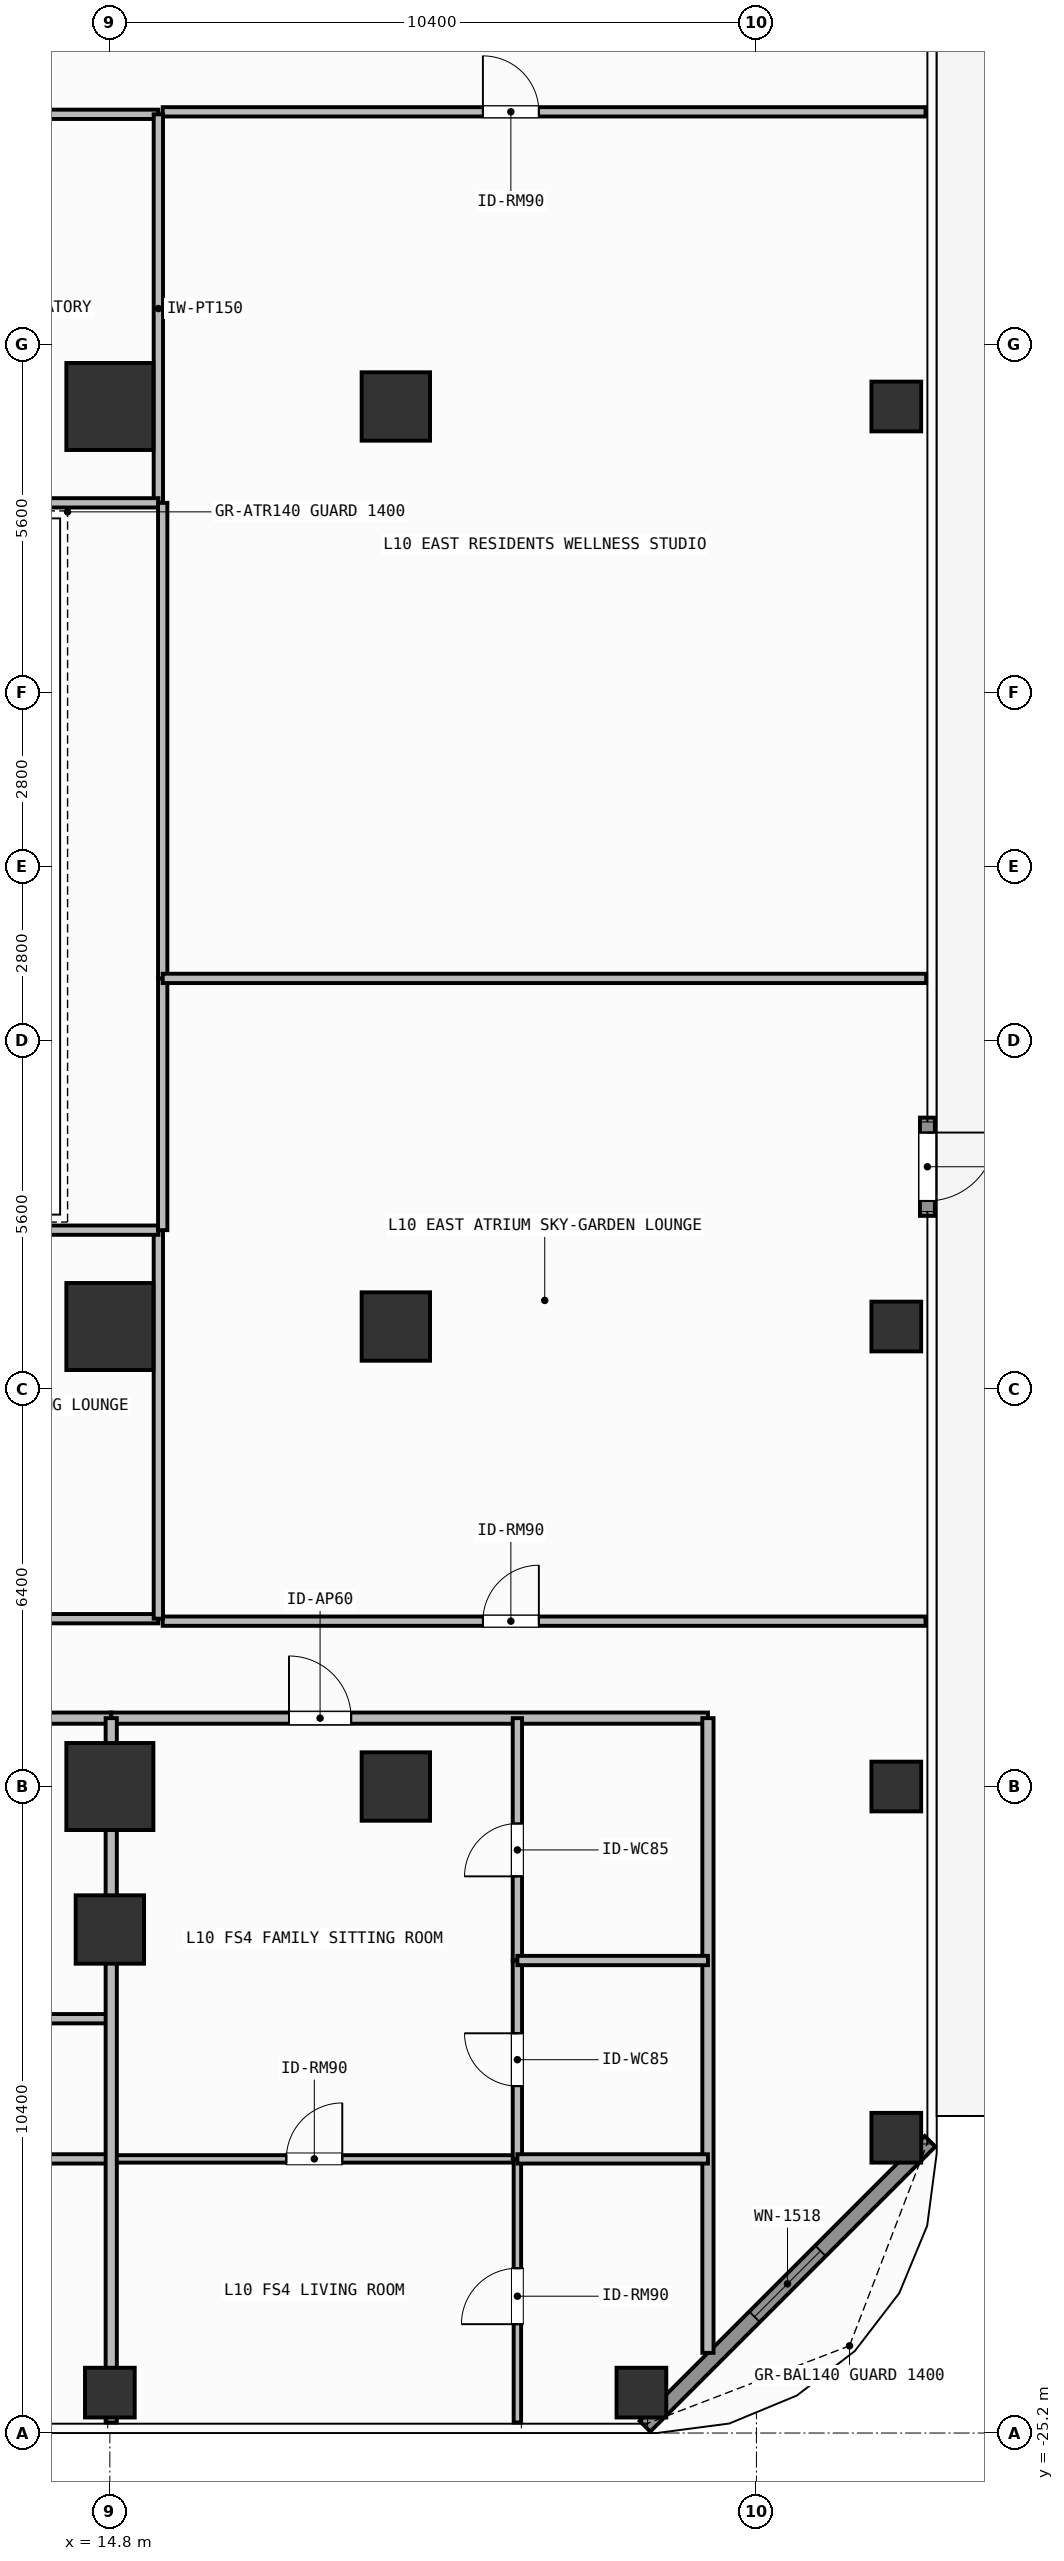
"""IFC4 building model, lengths in metres.
Left out: names, types, materials, properties, quantities, classifications, styles, units other than length and angle.
Written with IfcOpenShell. Run it as: python <this file> out.ifc"""

import sys

from ifc_helpers import new_model, si_unit, direction, frame, frame_2d, origin, origin_2d, place, context, subcontext, project, spatial, rectangle, hollow_rectangle, extrude, element, fill, save


model = new_model("IFC4")
c1 = context("Model", 3, precision=1e-05, world=origin(), true_north=direction((0.0, 1.0)))
c2 = subcontext(c1, "Body", "Model", "MODEL_VIEW")
j1 = project(units=[si_unit("LENGTHUNIT", "METRE"), si_unit("PLANEANGLEUNIT", "RADIAN")], contexts=[c1])
p1 = place(None, origin())
s1 = spatial("IfcSite", under=j1, at=p1, CompositionType="ELEMENT")
p2 = place(p1, origin())
s2 = spatial("IfcBuilding", under=s1, at=p2, CompositionType="ELEMENT")
p3 = place(p2, frame((0.0, 0.0, 38.4)))
s3 = spatial("IfcBuildingStorey", under=s2, at=p3, CompositionType="ELEMENT", Elevation=38.4)
for number, where, z_axis, x_axis in (
    (1, (14.8, -14.8, 0.0), (0.0, 0.0, 1.0), (1.0, 0.0, 0.0)),
    (2, (14.8, -7.4, 0.0), (0.0, 0.0, 1.0), (1.0, 0.0, 0.0)),
    (3, (14.8, 7.4, 0.0), (0.0, 0.0, 1.0), (1.0, 0.0, 0.0)),
):
    element("IfcColumn", number, at=place(p3, frame(where, z_axis=z_axis, x_axis=x_axis)), inside=s3, PredefinedType="COLUMN", context=c2, shape_type="SweptSolid", body=[
        extrude(rectangle(XDim=1.4, YDim=1.4, at=origin_2d()), origin(), (0.0, 0.0, 1.0), 3.9),
    ])
for number, where, z_axis, x_axis in (
    (4, (19.4, -14.8, 0.0), (0.0, 0.0, 1.0), (1.0, 0.0, 0.0)),
    (5, (19.4, -7.4, 0.0), (0.0, 0.0, 1.0), (1.0, 0.0, 0.0)),
    (6, (19.4, 7.4, 0.0), (0.0, 0.0, 1.0), (1.0, 0.0, 0.0)),
    (7, (14.8, -17.1, 0.0), (0.0, 0.0, 1.0), (1.0, 0.0, 0.0)),
):
    element("IfcColumn", number, at=place(p3, frame(where, z_axis=z_axis, x_axis=x_axis)), inside=s3, PredefinedType="COLUMN", context=c2, shape_type="SweptSolid", body=[
        extrude(rectangle(XDim=1.1, YDim=1.1, at=origin_2d()), origin(), (0.0, 0.0, 1.0), 3.9),
    ])
for number, where, z_axis, x_axis in (
    (8, (23.35, -24.55, 0.0), (0.0, 0.0, 1.0), (1.0, 0.0, 0.0)),
    (9, (27.45, -20.45, 0.0), (0.0, 0.0, 1.0), (1.0, 0.0, 0.0)),
    (10, (14.8, -24.55, 0.0), (0.0, 0.0, 1.0), (1.0, 0.0, 0.0)),
    (11, (27.45, -14.8, 0.0), (0.0, 0.0, 1.0), (1.0, 0.0, 0.0)),
    (12, (27.45, -7.4, 0.0), (0.0, 0.0, 1.0), (1.0, 0.0, 0.0)),
    (13, (27.45, 7.4, 0.0), (0.0, 0.0, 1.0), (1.0, 0.0, 0.0)),
):
    element("IfcColumn", number, at=place(p3, frame(where, z_axis=z_axis, x_axis=x_axis)), inside=s3, PredefinedType="COLUMN", context=c2, shape_type="SweptSolid", body=[
        extrude(hollow_rectangle(XDim=0.8, YDim=0.8, WallThickness=0.036, at=origin_2d()), origin(), (0.0, 0.0, 1.0), 3.9),
    ])
p4 = place(p3, frame((27.95, -4.04, 0.0), z_axis=(0.0, 0.0, 1.0), x_axis=(0.0, -1.0, 0.0)))
e14 = element("IfcWall", 14, at=p4, inside=s3, PredefinedType="SOLIDWALL", context=c2, shape_type="SweptSolid", body=[
    extrude(rectangle(XDim=1.58, YDim=0.24, at=frame_2d((0.79, 0.0))), origin(), (0.0, 0.0, 1.0), 3.68),
])
p5 = place(p4, frame((0.24, 0.0, 0.0)))
e15 = element("IfcOpeningElement", 15, at=p5, cuts=e14, PredefinedType="OPENING", context=c2, shape_type="SweptSolid", body=[
    extrude(rectangle(XDim=1.1, YDim=2.2, at=frame_2d((0.55, 1.1))), frame((0.0, 0.13, 0.0), z_axis=(0.0, -1.0, 0.0), x_axis=(1.0, 0.0, 0.0)), (0.0, 0.0, 1.0), 0.26),
])
p6 = place(p3, frame((27.992, -20.508, 0.0), z_axis=(0.0, 0.0, 1.0), x_axis=(-0.707106781187, -0.707106781187, 0.0)))
e16 = element("IfcWall", 16, at=p6, inside=s3, PredefinedType="SOLIDWALL", context=c2, shape_type="SweptSolid", body=[
    extrude(rectangle(XDim=6.484, YDim=0.24, at=frame_2d((3.242, 0.0))), origin(), (0.0, 0.0, 1.0), 3.68),
])
p7 = place(p6, frame((2.492, 0.0, 0.8)))
e17 = element("IfcOpeningElement", 17, at=p7, cuts=e16, PredefinedType="OPENING", context=c2, shape_type="SweptSolid", body=[
    extrude(rectangle(XDim=1.5, YDim=1.85, at=frame_2d((0.75, 0.925))), frame((0.0, 0.13, 0.0), z_axis=(0.0, -1.0, 0.0), x_axis=(1.0, 0.0, 0.0)), (0.0, 0.0, 1.0), 0.26),
])
p8 = place(p3, frame((10.1, -12.1, 0.0), z_axis=(0.0, 0.0, 1.0), x_axis=(1.0, 0.0, 0.0)))
e18 = element("IfcWall", 18, at=p8, inside=s3, PredefinedType="PARTITIONING", context=c2, shape_type="SweptSolid", body=[
    extrude(rectangle(XDim=5.48, YDim=0.15, at=frame_2d((2.74, 0.0))), origin(), (0.0, 0.0, 1.0), 3.68),
])
p9 = place(p8, frame((2.29, 0.0, 0.0)))
e19 = element("IfcOpeningElement", 19, at=p9, cuts=e18, PredefinedType="OPENING", context=c2, shape_type="SweptSolid", body=[
    extrude(rectangle(XDim=0.9, YDim=2.1, at=frame_2d((0.45, 1.05))), frame((0.0, 0.085, 0.0), z_axis=(0.0, -1.0, 0.0), x_axis=(1.0, 0.0, 0.0)), (0.0, 0.0, 1.0), 0.17),
])
p10 = place(p3, frame((8.36, 12.1, 0.0), z_axis=(0.0, 0.0, 1.0), x_axis=(1.0, 0.0, 0.0)))
e20 = element("IfcWall", 20, at=p10, inside=s3, PredefinedType="PARTITIONING", context=c2, shape_type="SweptSolid", body=[
    extrude(rectangle(XDim=7.22, YDim=0.15, at=frame_2d((3.61, 0.0))), origin(), (0.0, 0.0, 1.0), 3.68),
])
p11 = place(p10, frame((3.513, 0.0, 0.0)))
e21 = element("IfcOpeningElement", 21, at=p11, cuts=e20, PredefinedType="OPENING", context=c2, shape_type="SweptSolid", body=[
    extrude(rectangle(XDim=0.9, YDim=2.1, at=frame_2d((0.45, 1.05))), frame((0.0, 0.085, 0.0), z_axis=(0.0, -1.0, 0.0), x_axis=(1.0, 0.0, 0.0)), (0.0, 0.0, 1.0), 0.17),
])
p12 = place(p3, frame((2.9, -13.7, 0.0), z_axis=(0.0, 0.0, 1.0), x_axis=(1.0, 0.0, 0.0)))
e22 = element("IfcWall", 22, at=p12, inside=s3, PredefinedType="PARTITIONING", context=c2, shape_type="SweptSolid", body=[
    extrude(rectangle(XDim=11.922, YDim=0.18, at=frame_2d((5.961, 0.0))), origin(), (0.0, 0.0, 1.0), 3.68),
])
p13 = place(p12, frame((5.371, 0.0, 0.0)))
e23 = element("IfcOpeningElement", 23, at=p13, cuts=e22, PredefinedType="OPENING", context=c2, shape_type="SweptSolid", body=[
    extrude(rectangle(XDim=1.0, YDim=2.2, at=frame_2d((0.5, 1.1))), frame((0.0, 0.1, 0.0), z_axis=(0.0, -1.0, 0.0), x_axis=(1.0, 0.0, 0.0)), (0.0, 0.0, 1.0), 0.2),
])
p14 = place(p3, frame((14.822, -13.7, 0.0), z_axis=(0.0, 0.0, 1.0), x_axis=(1.0, 0.0, 0.0)))
e24 = element("IfcWall", 24, at=p14, inside=s3, PredefinedType="PARTITIONING", context=c2, shape_type="SweptSolid", body=[
    extrude(rectangle(XDim=9.598, YDim=0.18, at=frame_2d((4.799, 0.0))), origin(), (0.0, 0.0, 1.0), 3.68),
])
p15 = place(p14, frame((2.859, 0.0, 0.0)))
e25 = element("IfcOpeningElement", 25, at=p15, cuts=e24, PredefinedType="OPENING", context=c2, shape_type="SweptSolid", body=[
    extrude(rectangle(XDim=1.0, YDim=2.2, at=frame_2d((0.5, 1.1))), frame((0.0, 0.1, 0.0), z_axis=(0.0, -1.0, 0.0), x_axis=(1.0, 0.0, 0.0)), (0.0, 0.0, 1.0), 0.2),
])
p16 = place(p3, frame((14.822, -20.79, 0.0), z_axis=(0.0, 0.0, 1.0), x_axis=(1.0, 0.0, 0.0)))
e26 = element("IfcWall", 26, at=p16, inside=s3, PredefinedType="PARTITIONING", context=c2, shape_type="SweptSolid", body=[
    extrude(rectangle(XDim=6.533, YDim=0.12, at=frame_2d((3.267, 0.0))), origin(), (0.0, 0.0, 1.0), 3.68),
])
p17 = place(p16, frame((2.816, 0.0, 0.0)))
e27 = element("IfcOpeningElement", 27, at=p17, cuts=e26, PredefinedType="OPENING", context=c2, shape_type="SweptSolid", body=[
    extrude(rectangle(XDim=0.9, YDim=2.1, at=frame_2d((0.45, 1.05))), frame((0.0, 0.07, 0.0), z_axis=(0.0, -1.0, 0.0), x_axis=(1.0, 0.0, 0.0)), (0.0, 0.0, 1.0), 0.14),
])
p18 = place(p3, frame((21.355, -17.599, 0.0), z_axis=(0.0, 0.0, 1.0), x_axis=(0.0, 1.0, 0.0)))
e28 = element("IfcWall", 28, at=p18, inside=s3, PredefinedType="PARTITIONING", context=c2, shape_type="SweptSolid", body=[
    extrude(rectangle(XDim=3.899, YDim=0.15, at=frame_2d((1.95, 0.0))), origin(), (0.0, 0.0, 1.0), 3.68),
])
p19 = place(p18, frame((1.354, 0.0, 0.0)))
e29 = element("IfcOpeningElement", 29, at=p19, cuts=e28, PredefinedType="OPENING", context=c2, shape_type="SweptSolid", body=[
    extrude(rectangle(XDim=0.85, YDim=2.1, at=frame_2d((0.425, 1.05))), frame((0.0, 0.085, 0.0), z_axis=(0.0, -1.0, 0.0), x_axis=(1.0, 0.0, 0.0)), (0.0, 0.0, 1.0), 0.17),
])
p20 = place(p3, frame((21.355, -20.79, 0.0), z_axis=(0.0, 0.0, 1.0), x_axis=(0.0, 1.0, 0.0)))
e30 = element("IfcWall", 30, at=p20, inside=s3, PredefinedType="PARTITIONING", context=c2, shape_type="SweptSolid", body=[
    extrude(rectangle(XDim=3.191, YDim=0.15, at=frame_2d((1.595, 0.0))), origin(), (0.0, 0.0, 1.0), 3.68),
])
p21 = place(p20, frame((1.17, 0.0, 0.0)))
e31 = element("IfcOpeningElement", 31, at=p21, cuts=e30, PredefinedType="OPENING", context=c2, shape_type="SweptSolid", body=[
    extrude(rectangle(XDim=0.85, YDim=2.1, at=frame_2d((0.425, 1.05))), frame((0.0, 0.085, 0.0), z_axis=(0.0, -1.0, 0.0), x_axis=(1.0, 0.0, 0.0)), (0.0, 0.0, 1.0), 0.17),
])
p22 = place(p3, frame((21.355, -25.03, 0.0), z_axis=(0.0, 0.0, 1.0), x_axis=(0.0, 1.0, 0.0)))
e32 = element("IfcWall", 32, at=p22, inside=s3, PredefinedType="PARTITIONING", context=c2, shape_type="SweptSolid", body=[
    extrude(rectangle(XDim=4.24, YDim=0.12, at=frame_2d((2.12, 0.0))), origin(), (0.0, 0.0, 1.0), 3.68),
])
p23 = place(p22, frame((1.581, 0.0, 0.0)))
e33 = element("IfcOpeningElement", 33, at=p23, cuts=e32, PredefinedType="OPENING", context=c2, shape_type="SweptSolid", body=[
    extrude(rectangle(XDim=0.9, YDim=2.1, at=frame_2d((0.45, 1.05))), frame((0.0, 0.07, 0.0), z_axis=(0.0, -1.0, 0.0), x_axis=(1.0, 0.0, 0.0)), (0.0, 0.0, 1.0), 0.14),
])
p24 = place(p3, frame((15.65, -12.14, 0.0), z_axis=(0.0, 0.0, 1.0), x_axis=(1.0, 0.0, 0.0)))
e34 = element("IfcWall", 34, at=p24, inside=s3, PredefinedType="PARTITIONING", context=c2, shape_type="SweptSolid", body=[
    extrude(rectangle(XDim=12.27, YDim=0.15, at=frame_2d((6.135, 0.0))), origin(), (0.0, 0.0, 1.0), 3.68),
])
p25 = place(p24, frame((5.15, 0.0, 0.0)))
e35 = element("IfcOpeningElement", 35, at=p25, cuts=e34, PredefinedType="OPENING", context=c2, shape_type="SweptSolid", body=[
    extrude(rectangle(XDim=0.9, YDim=2.1, at=frame_2d((0.45, 1.05))), frame((0.0, 0.085, 0.0), z_axis=(0.0, -1.0, 0.0), x_axis=(1.0, 0.0, 0.0)), (0.0, 0.0, 1.0), 0.17),
])
p26 = place(p3, frame((15.65, 12.14, 0.0), z_axis=(0.0, 0.0, 1.0), x_axis=(1.0, 0.0, 0.0)))
e36 = element("IfcWall", 36, at=p26, inside=s3, PredefinedType="PARTITIONING", context=c2, shape_type="SweptSolid", body=[
    extrude(rectangle(XDim=12.27, YDim=0.15, at=frame_2d((6.135, 0.0))), origin(), (0.0, 0.0, 1.0), 3.68),
])
p27 = place(p26, frame((5.15, 0.0, 0.0)))
e37 = element("IfcOpeningElement", 37, at=p27, cuts=e36, PredefinedType="OPENING", context=c2, shape_type="SweptSolid", body=[
    extrude(rectangle(XDim=0.9, YDim=2.1, at=frame_2d((0.45, 1.05))), frame((0.0, 0.085, 0.0), z_axis=(0.0, -1.0, 0.0), x_axis=(1.0, 0.0, 0.0)), (0.0, 0.0, 1.0), 0.17),
])
p28 = place(p3, frame((15.58, -12.1, 0.0), z_axis=(0.0, 0.0, 1.0), x_axis=(0.0, 1.0, 0.0)))
e38 = element("IfcWall", 38, at=p28, inside=s3, PredefinedType="PARTITIONING", context=c2, shape_type="SweptSolid", body=[
    extrude(rectangle(XDim=6.25, YDim=0.15, at=frame_2d((3.125, 0.0))), origin(), (0.0, 0.0, 1.0), 3.68),
])
p29 = place(p3, frame((8.96, -5.85, 0.0), z_axis=(0.0, 0.0, 1.0), x_axis=(1.0, 0.0, 0.0)))
e39 = element("IfcWall", 39, at=p29, inside=s3, PredefinedType="PARTITIONING", context=c2, shape_type="SweptSolid", body=[
    extrude(rectangle(XDim=6.62, YDim=0.15, at=frame_2d((3.31, 0.0))), origin(), (0.0, 0.0, 1.0), 3.68),
])
p30 = place(p3, frame((15.58, 5.85, 0.0), z_axis=(0.0, 0.0, 1.0), x_axis=(0.0, 1.0, 0.0)))
e40 = element("IfcWall", 40, at=p30, inside=s3, PredefinedType="PARTITIONING", context=c2, shape_type="SweptSolid", body=[
    extrude(rectangle(XDim=6.25, YDim=0.15, at=frame_2d((3.125, 0.0))), origin(), (0.0, 0.0, 1.0), 3.68),
])
p31 = place(p3, frame((8.96, 5.85, 0.0), z_axis=(0.0, 0.0, 1.0), x_axis=(1.0, 0.0, 0.0)))
e41 = element("IfcWall", 41, at=p31, inside=s3, PredefinedType="PARTITIONING", context=c2, shape_type="SweptSolid", body=[
    extrude(rectangle(XDim=6.62, YDim=0.15, at=frame_2d((3.31, 0.0))), origin(), (0.0, 0.0, 1.0), 3.68),
])
p32 = place(p3, frame((24.42, -23.91, 0.0), z_axis=(0.0, 0.0, 1.0), x_axis=(0.0, 1.0, 0.0)))
e42 = element("IfcWall", 42, at=p32, inside=s3, PredefinedType="PARTITIONING", context=c2, shape_type="SweptSolid", body=[
    extrude(rectangle(XDim=10.21, YDim=0.18, at=frame_2d((5.105, 0.0))), origin(), (0.0, 0.0, 1.0), 3.68),
])
for number, where, z_axis, x_axis in (
    (43, (11.102, -18.535, 0.0), (0.0, 0.0, 1.0), (1.0, 0.0, 0.0)),
    (44, (11.102, -20.79, 0.0), (0.0, 0.0, 1.0), (1.0, 0.0, 0.0)),
):
    element("IfcWall", number, at=place(p3, frame(where, z_axis=z_axis, x_axis=x_axis)), inside=s3, PredefinedType="PARTITIONING", context=c2, shape_type="SweptSolid", body=[
        extrude(rectangle(XDim=3.72, YDim=0.15, at=frame_2d((1.86, 0.0))), origin(), (0.0, 0.0, 1.0), 3.68),
    ])
for number, where, z_axis, x_axis in (
    (45, (21.355, -17.599, 0.0), (0.0, 0.0, 1.0), (1.0, 0.0, 0.0)),
    (46, (21.355, -20.79, 0.0), (0.0, 0.0, 1.0), (1.0, 0.0, 0.0)),
):
    element("IfcWall", number, at=place(p3, frame(where, z_axis=z_axis, x_axis=x_axis)), inside=s3, PredefinedType="PARTITIONING", context=c2, shape_type="SweptSolid", body=[
        extrude(rectangle(XDim=3.065, YDim=0.15, at=frame_2d((1.532, 0.0))), origin(), (0.0, 0.0, 1.0), 3.68),
    ])
p33 = place(p3, frame((14.822, -25.03, 0.0), z_axis=(0.0, 0.0, 1.0), x_axis=(0.0, 1.0, 0.0)))
e47 = element("IfcWall", 47, at=p33, inside=s3, PredefinedType="PARTITIONING", context=c2, shape_type="SweptSolid", body=[
    extrude(rectangle(XDim=11.33, YDim=0.18, at=frame_2d((5.665, 0.0))), origin(), (0.0, 0.0, 1.0), 3.082),
])
p34 = place(p3, frame((15.65, -5.85, 0.0), z_axis=(0.0, 0.0, 1.0), x_axis=(0.0, 1.0, 0.0)))
e48 = element("IfcWall", 48, at=p34, inside=s3, PredefinedType="PARTITIONING", context=c2, shape_type="SweptSolid", body=[
    extrude(rectangle(XDim=4.05, YDim=0.15, at=frame_2d((2.025, 0.0))), origin(), (0.0, 0.0, 1.0), 3.68),
])
p35 = place(p3, frame((15.65, -1.8, 0.0), z_axis=(0.0, 0.0, 1.0), x_axis=(0.0, 1.0, 0.0)))
e49 = element("IfcWall", 49, at=p35, inside=s3, PredefinedType="PARTITIONING", context=c2, shape_type="SweptSolid", body=[
    extrude(rectangle(XDim=7.65, YDim=0.15, at=frame_2d((3.825, 0.0))), origin(), (0.0, 0.0, 1.0), 3.68),
])
p36 = place(p3, frame((15.65, -1.8, 0.0), z_axis=(0.0, 0.0, 1.0), x_axis=(1.0, 0.0, 0.0)))
e50 = element("IfcWall", 50, at=p36, inside=s3, PredefinedType="PARTITIONING", context=c2, shape_type="SweptSolid", body=[
    extrude(rectangle(XDim=12.28, YDim=0.15, at=frame_2d((6.14, 0.0))), origin(), (0.0, 0.0, 1.0), 3.68),
])
p37 = place(p5, origin())
e51 = element("IfcDoor", 51, at=p37, inside=s3, OperationType="SINGLE_SWING_LEFT", PredefinedType="DOOR", context=c2, shape_type="SweptSolid", body=[
    extrude(rectangle(XDim=1.1, YDim=2.2, at=frame_2d((0.55, 1.1))), frame((0.0, 0.025, 0.0), z_axis=(0.0, -1.0, 0.0), x_axis=(1.0, 0.0, 0.0)), (0.0, 0.0, 1.0), 0.05),
])
fill(e15, e51)
p38 = place(p7, origin())
e52 = element("IfcWindow", 52, at=p38, inside=s3, PartitioningType="SINGLE_PANEL", PredefinedType="WINDOW", context=c2, shape_type="SweptSolid", body=[
    extrude(rectangle(XDim=1.5, YDim=1.85, at=frame_2d((0.75, 0.925))), frame((0.0, 0.03, 0.0), z_axis=(0.0, -1.0, 0.0), x_axis=(1.0, 0.0, 0.0)), (0.0, 0.0, 1.0), 0.06),
])
fill(e17, e52)
p39 = place(p15, origin())
e53 = element("IfcDoor", 53, at=p39, inside=s3, OperationType="SINGLE_SWING_LEFT", PredefinedType="DOOR", context=c2, shape_type="SweptSolid", body=[
    extrude(rectangle(XDim=1.0, YDim=2.2, at=frame_2d((0.5, 1.1))), frame((0.0, 0.025, 0.0), z_axis=(0.0, -1.0, 0.0), x_axis=(1.0, 0.0, 0.0)), (0.0, 0.0, 1.0), 0.05),
])
fill(e25, e53)
p40 = place(p17, origin())
e54 = element("IfcDoor", 54, at=p40, inside=s3, OperationType="SINGLE_SWING_RIGHT", PredefinedType="DOOR", context=c2, shape_type="SweptSolid", body=[
    extrude(rectangle(XDim=0.9, YDim=2.1, at=frame_2d((0.45, 1.05))), frame((0.0, 0.025, 0.0), z_axis=(0.0, -1.0, 0.0), x_axis=(1.0, 0.0, 0.0)), (0.0, 0.0, 1.0), 0.05),
])
fill(e27, e54)
p41 = place(p19, origin())
e55 = element("IfcDoor", 55, at=p41, inside=s3, OperationType="SINGLE_SWING_LEFT", PredefinedType="DOOR", context=c2, shape_type="SweptSolid", body=[
    extrude(rectangle(XDim=0.85, YDim=2.1, at=frame_2d((0.425, 1.05))), frame((0.0, 0.025, 0.0), z_axis=(0.0, -1.0, 0.0), x_axis=(1.0, 0.0, 0.0)), (0.0, 0.0, 1.0), 0.05),
])
fill(e29, e55)
p42 = place(p21, origin())
e56 = element("IfcDoor", 56, at=p42, inside=s3, OperationType="SINGLE_SWING_RIGHT", PredefinedType="DOOR", context=c2, shape_type="SweptSolid", body=[
    extrude(rectangle(XDim=0.85, YDim=2.1, at=frame_2d((0.425, 1.05))), frame((0.0, 0.025, 0.0), z_axis=(0.0, -1.0, 0.0), x_axis=(1.0, 0.0, 0.0)), (0.0, 0.0, 1.0), 0.05),
])
fill(e31, e56)
p43 = place(p23, origin())
e57 = element("IfcDoor", 57, at=p43, inside=s3, OperationType="SINGLE_SWING_LEFT", PredefinedType="DOOR", context=c2, shape_type="SweptSolid", body=[
    extrude(rectangle(XDim=0.9, YDim=2.1, at=frame_2d((0.45, 1.05))), frame((0.0, 0.025, 0.0), z_axis=(0.0, -1.0, 0.0), x_axis=(1.0, 0.0, 0.0)), (0.0, 0.0, 1.0), 0.05),
])
fill(e33, e57)
p44 = place(p25, origin())
e58 = element("IfcDoor", 58, at=p44, inside=s3, OperationType="SINGLE_SWING_RIGHT", PredefinedType="DOOR", context=c2, shape_type="SweptSolid", body=[
    extrude(rectangle(XDim=0.9, YDim=2.1, at=frame_2d((0.45, 1.05))), frame((0.0, 0.025, 0.0), z_axis=(0.0, -1.0, 0.0), x_axis=(1.0, 0.0, 0.0)), (0.0, 0.0, 1.0), 0.05),
])
fill(e35, e58)
p45 = place(p27, origin())
e59 = element("IfcDoor", 59, at=p45, inside=s3, OperationType="SINGLE_SWING_LEFT", PredefinedType="DOOR", context=c2, shape_type="SweptSolid", body=[
    extrude(rectangle(XDim=0.9, YDim=2.1, at=frame_2d((0.45, 1.05))), frame((0.0, 0.025, 0.0), z_axis=(0.0, -1.0, 0.0), x_axis=(1.0, 0.0, 0.0)), (0.0, 0.0, 1.0), 0.05),
])
fill(e37, e59)
save(model, sys.argv[1])
